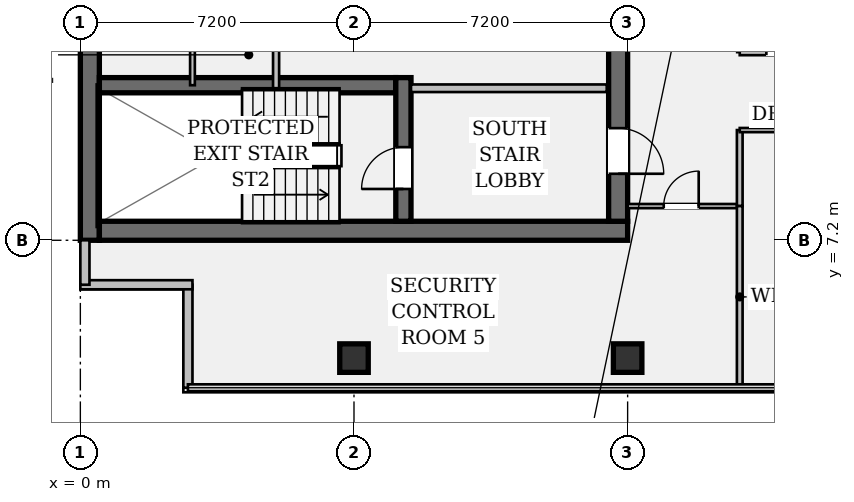
"""IFC4 building model, lengths in metres.
Left out: names, types, materials, properties, quantities, classifications, styles, units other than length and angle.
Written with IfcOpenShell. Run it as: python <this file> out.ifc"""

import sys

from ifc_helpers import new_model, si_unit, direction, frame, frame_2d, origin, origin_2d, place, context, subcontext, project, spatial, rectangle, hollow_rectangle, extrude, element, fill, save


model = new_model("IFC4")
c1 = context("Model", 3, precision=1e-05, world=origin(), true_north=direction((0.0, 1.0)))
c2 = subcontext(c1, "Body", "Model", "MODEL_VIEW")
j1 = project(units=[si_unit("LENGTHUNIT", "METRE"), si_unit("PLANEANGLEUNIT", "RADIAN")], contexts=[c1])
p1 = place(None, origin())
s1 = spatial("IfcSite", under=j1, at=p1, CompositionType="ELEMENT")
p2 = place(p1, origin())
s2 = spatial("IfcBuilding", under=s1, at=p2, CompositionType="ELEMENT")
p3 = place(p2, frame((0.0, 0.0, 229.25)))
s3 = spatial("IfcBuildingStorey", under=s2, at=p3, CompositionType="ELEMENT", Elevation=229.25)
p4 = place(p3, frame((0.25, 7.2, 0.0), z_axis=(0.0, 0.0, 1.0), x_axis=(0.0, 1.0, 0.0)))
e1 = element("IfcWall", 1, at=p4, inside=s3, PredefinedType="SHEAR", context=c2, shape_type="SweptSolid", body=[
    extrude(rectangle(XDim=28.8, YDim=0.5, at=frame_2d((14.4, 0.0))), origin(), (0.0, 0.0, 1.0), 3.24),
])
p5 = place(p3, frame((0.5, 7.45, 0.0), z_axis=(0.0, 0.0, 1.0), x_axis=(1.0, 0.0, 0.0)))
e2 = element("IfcWall", 2, at=p5, inside=s3, PredefinedType="SHEAR", context=c2, shape_type="SweptSolid", body=[
    extrude(rectangle(XDim=13.9, YDim=0.5, at=frame_2d((6.95, 0.0))), origin(), (0.0, 0.0, 1.0), 3.24),
])
p6 = place(p3, frame((14.15, 35.5, 0.0), z_axis=(0.0, 0.0, 1.0), x_axis=(0.0, -1.0, 0.0)))
e3 = element("IfcWall", 3, at=p6, inside=s3, PredefinedType="SHEAR", context=c2, shape_type="SweptSolid", body=[
    extrude(rectangle(XDim=27.8, YDim=0.5, at=frame_2d((13.9, 0.0))), origin(), (0.0, 0.0, 1.0), 3.24),
])
p7 = place(p6, frame((1.4, 0.0, 0.0)))
e4 = element("IfcOpeningElement", 4, at=p7, cuts=e3, PredefinedType="OPENING", context=c2, shape_type="SweptSolid", body=[
    extrude(rectangle(XDim=1.2, YDim=2.15, at=frame_2d((0.6, 1.075))), frame((0.0, 0.262, 0.0), z_axis=(0.0, -1.0, 0.0), x_axis=(1.0, 0.0, 0.0)), (0.0, 0.0, 1.0), 0.524),
])
p8 = place(p6, frame((25.35, 0.0, 0.0)))
e5 = element("IfcOpeningElement", 5, at=p8, cuts=e3, PredefinedType="OPENING", context=c2, shape_type="SweptSolid", body=[
    extrude(rectangle(XDim=1.2, YDim=2.15, at=frame_2d((0.6, 1.075))), frame((0.0, 0.262, 0.0), z_axis=(0.0, -1.0, 0.0), x_axis=(1.0, 0.0, 0.0)), (0.0, 0.0, 1.0), 0.524),
])
p9 = place(p6, frame((14.7, 0.0, 0.0)))
e6 = element("IfcOpeningElement", 6, at=p9, cuts=e3, PredefinedType="OPENING", context=c2, shape_type="SweptSolid", body=[
    extrude(rectangle(XDim=1.6, YDim=2.2, at=frame_2d((0.8, 1.1))), frame((0.0, 0.262, 0.0), z_axis=(0.0, -1.0, 0.0), x_axis=(1.0, 0.0, 0.0)), (0.0, 0.0, 1.0), 0.524),
])
p10 = place(p3, frame((0.5, 11.28, 0.0), z_axis=(0.0, 0.0, 1.0), x_axis=(1.0, 0.0, 0.0)))
e7 = element("IfcWall", 7, at=p10, inside=s3, PredefinedType="SHEAR", context=c2, shape_type="SweptSolid", body=[
    extrude(rectangle(XDim=7.8, YDim=0.4, at=frame_2d((3.9, 0.0))), origin(), (0.0, 0.0, 1.0), 3.24),
])
p11 = place(p3, frame((8.5, 7.7, 0.0), z_axis=(0.0, 0.0, 1.0), x_axis=(0.0, 1.0, 0.0)))
e8 = element("IfcWall", 8, at=p11, inside=s3, PredefinedType="SHEAR", context=c2, shape_type="SweptSolid", body=[
    extrude(rectangle(XDim=3.78, YDim=0.4, at=frame_2d((1.89, 0.0))), origin(), (0.0, 0.0, 1.0), 3.24),
])
p12 = place(p11, frame((0.85, 0.0, 0.0)))
e9 = element("IfcOpeningElement", 9, at=p12, cuts=e8, PredefinedType="OPENING", context=c2, shape_type="SweptSolid", body=[
    extrude(rectangle(XDim=1.1, YDim=2.15, at=frame_2d((0.55, 1.075))), frame((0.0, 0.212, 0.0), z_axis=(0.0, -1.0, 0.0), x_axis=(1.0, 0.0, 0.0)), (0.0, 0.0, 1.0), 0.424),
])
for number, where, z_axis, x_axis in (
    (10, (7.2, 4.1, 0.0), (0.0, 0.0, 1.0), (1.0, 0.0, 0.0)),
    (11, (14.4, 4.1, 0.0), (0.0, 0.0, 1.0), (1.0, 0.0, 0.0)),
):
    element("IfcColumn", number, at=place(p3, frame(where, z_axis=z_axis, x_axis=x_axis)), inside=s3, PredefinedType="COLUMN", context=c2, shape_type="SweptSolid", body=[
        extrude(hollow_rectangle(XDim=0.75, YDim=0.75, WallThickness=0.045, at=origin_2d()), origin(), (0.0, 0.0, 1.0), 3.24),
    ])
p13 = place(p3, frame((2.83, 3.32, 0.0), z_axis=(0.0, 0.0, 1.0), x_axis=(0.0, 1.0, 0.0)))
e12 = element("IfcWall", 12, at=p13, inside=s3, PredefinedType="STANDARD", context=c2, shape_type="SweptSolid", body=[
    extrude(rectangle(XDim=2.71, YDim=0.24, at=frame_2d((1.355, 0.0))), origin(), (0.0, 0.0, 1.0), 3.24),
])
p14 = place(p3, frame((2.95, 6.03, 0.0), z_axis=(0.0, 0.0, 1.0), x_axis=(-1.0, 0.0, 0.0)))
e13 = element("IfcWall", 13, at=p14, inside=s3, PredefinedType="STANDARD", context=c2, shape_type="SweptSolid", body=[
    extrude(rectangle(XDim=2.95, YDim=0.24, at=frame_2d((1.475, 0.0))), origin(), (0.0, 0.0, 1.0), 3.24),
])
p15 = place(p3, frame((0.12, 6.03, 0.0), z_axis=(0.0, 0.0, 1.0), x_axis=(0.0, 1.0, 0.0)))
e14 = element("IfcWall", 14, at=p15, inside=s3, PredefinedType="STANDARD", context=c2, shape_type="SweptSolid", body=[
    extrude(rectangle(XDim=1.17, YDim=0.24, at=frame_2d((0.585, 0.0))), origin(), (0.0, 0.0, 1.0), 3.24),
])
p16 = place(p3, frame((8.7, 11.2, 0.0), z_axis=(0.0, 0.0, 1.0), x_axis=(1.0, 0.0, 0.0)))
e15 = element("IfcWall", 15, at=p16, inside=s3, PredefinedType="PARTITIONING", context=c2, shape_type="SweptSolid", body=[
    extrude(rectangle(XDim=5.15, YDim=0.2, at=frame_2d((2.575, 0.0))), origin(), (0.0, 0.0, 1.0), 3.24),
])
p17 = place(p3, frame((5.15, 11.2, 0.0), z_axis=(0.0, 0.0, 1.0), x_axis=(0.0, 1.0, 0.0)))
e16 = element("IfcWall", 16, at=p17, inside=s3, PredefinedType="PARTITIONING", context=c2, shape_type="SweptSolid", body=[
    extrude(rectangle(XDim=6.6, YDim=0.16, at=frame_2d((3.3, 0.0))), origin(), (0.0, 0.0, 1.0), 3.24),
])
p18 = place(p3, frame((2.95, 11.28, 0.0), z_axis=(0.0, 0.0, 1.0), x_axis=(0.0, 1.0, 0.0)))
e17 = element("IfcWall", 17, at=p18, inside=s3, PredefinedType="PARTITIONING", context=c2, shape_type="SweptSolid", body=[
    extrude(rectangle(XDim=4.42, YDim=0.125, at=frame_2d((2.21, 0.0))), origin(), (0.0, 0.0, 1.0), 3.24),
])
p19 = place(p18, frame((1.6, 0.0, 0.0)))
e18 = element("IfcOpeningElement", 18, at=p19, cuts=e17, PredefinedType="OPENING", context=c2, shape_type="SweptSolid", body=[
    extrude(rectangle(XDim=0.85, YDim=2.15, at=frame_2d((0.425, 1.075))), frame((0.0, 0.074, 0.0), z_axis=(0.0, -1.0, 0.0), x_axis=(1.0, 0.0, 0.0)), (0.0, 0.0, 1.0), 0.149),
])
p20 = place(p3, frame((14.4, 8.1, 0.0), z_axis=(0.0, 0.0, 1.0), x_axis=(1.0, 0.0, 0.0)))
e19 = element("IfcWall", 19, at=p20, inside=s3, PredefinedType="PARTITIONING", context=c2, shape_type="SweptSolid", body=[
    extrude(rectangle(XDim=2.95, YDim=0.11, at=frame_2d((1.475, 0.0))), origin(), (0.0, 0.0, 1.0), 2.808),
])
p21 = place(p20, frame((0.95, 0.0, 0.0)))
e20 = element("IfcOpeningElement", 20, at=p21, cuts=e19, PredefinedType="OPENING", context=c2, shape_type="SweptSolid", body=[
    extrude(rectangle(XDim=0.92, YDim=2.15, at=frame_2d((0.46, 1.075))), frame((0.0, 0.067, 0.0), z_axis=(0.0, -1.0, 0.0), x_axis=(1.0, 0.0, 0.0)), (0.0, 0.0, 1.0), 0.134),
])
p22 = place(p3, frame((17.35, 8.1, 0.0), z_axis=(0.0, 0.0, 1.0), x_axis=(0.0, 1.0, 0.0)))
e21 = element("IfcWall", 21, at=p22, inside=s3, PredefinedType="PARTITIONING", context=c2, shape_type="SweptSolid", body=[
    extrude(rectangle(XDim=2.0, YDim=0.15, at=frame_2d((1.0, 0.0))), origin(), (0.0, 0.0, 1.0), 3.24),
])
p23 = place(p3, frame((17.35, 12.15, 0.0), z_axis=(0.0, 0.0, 1.0), x_axis=(0.0, 1.0, 0.0)))
e22 = element("IfcWall", 22, at=p23, inside=s3, PredefinedType="PARTITIONING", context=c2, shape_type="SweptSolid", body=[
    extrude(rectangle(XDim=23.05, YDim=0.135, at=frame_2d((11.525, 0.0))), origin(), (0.0, 0.0, 1.0), 2.325),
])
p24 = place(p23, frame((4.3, 0.0, 0.0)))
e23 = element("IfcOpeningElement", 23, at=p24, cuts=e22, PredefinedType="OPENING", context=c2, shape_type="SweptSolid", body=[
    extrude(rectangle(XDim=0.92, YDim=2.15, at=frame_2d((0.46, 1.075))), frame((0.0, 0.08, 0.0), z_axis=(0.0, -1.0, 0.0), x_axis=(1.0, 0.0, 0.0)), (0.0, 0.0, 1.0), 0.159),
])
p25 = place(p23, frame((8.0, 0.0, 0.0)))
e24 = element("IfcOpeningElement", 24, at=p25, cuts=e22, PredefinedType="OPENING", context=c2, shape_type="SweptSolid", body=[
    extrude(rectangle(XDim=0.92, YDim=2.15, at=frame_2d((0.46, 1.075))), frame((0.0, 0.08, 0.0), z_axis=(0.0, -1.0, 0.0), x_axis=(1.0, 0.0, 0.0)), (0.0, 0.0, 1.0), 0.159),
])
p26 = place(p23, frame((16.32, 0.0, 0.0)))
e25 = element("IfcOpeningElement", 25, at=p26, cuts=e22, PredefinedType="OPENING", context=c2, shape_type="SweptSolid", body=[
    extrude(rectangle(XDim=0.92, YDim=2.15, at=frame_2d((0.46, 1.075))), frame((0.0, 0.08, 0.0), z_axis=(0.0, -1.0, 0.0), x_axis=(1.0, 0.0, 0.0)), (0.0, 0.0, 1.0), 0.159),
])
p27 = place(p3, frame((17.35, 10.1, 0.0), z_axis=(0.0, 0.0, 1.0), x_axis=(1.0, 0.0, 0.0)))
e26 = element("IfcWall", 26, at=p27, inside=s3, PredefinedType="PARTITIONING", context=c2, shape_type="SweptSolid", body=[
    extrude(rectangle(XDim=17.4, YDim=0.11, at=frame_2d((8.7, 0.0))), origin(), (0.0, 0.0, 1.0), 2.325),
])
p28 = place(p27, frame((4.02, 0.0, 0.0)))
e27 = element("IfcOpeningElement", 27, at=p28, cuts=e26, PredefinedType="OPENING", context=c2, shape_type="SweptSolid", body=[
    extrude(rectangle(XDim=0.92, YDim=2.15, at=frame_2d((0.46, 1.075))), frame((0.0, 0.067, 0.0), z_axis=(0.0, -1.0, 0.0), x_axis=(1.0, 0.0, 0.0)), (0.0, 0.0, 1.0), 0.134),
])
p29 = place(p27, frame((12.72, 0.0, 0.0)))
e28 = element("IfcOpeningElement", 28, at=p29, cuts=e26, PredefinedType="OPENING", context=c2, shape_type="SweptSolid", body=[
    extrude(rectangle(XDim=0.92, YDim=2.15, at=frame_2d((0.46, 1.075))), frame((0.0, 0.067, 0.0), z_axis=(0.0, -1.0, 0.0), x_axis=(1.0, 0.0, 0.0)), (0.0, 0.0, 1.0), 0.134),
])
p30 = place(p3, frame((17.35, 12.15, 0.0), z_axis=(0.0, 0.0, 1.0), x_axis=(1.0, 0.0, 0.0)))
e29 = element("IfcWall", 29, at=p30, inside=s3, PredefinedType="PARTITIONING", context=c2, shape_type="SweptSolid", body=[
    extrude(rectangle(XDim=17.4, YDim=0.16, at=frame_2d((8.7, 0.0))), origin(), (0.0, 0.0, 1.0), 2.325),
])
p31 = place(p30, frame((0.7, 0.0, 0.0)))
e30 = element("IfcOpeningElement", 30, at=p31, cuts=e29, PredefinedType="OPENING", context=c2, shape_type="SweptSolid", body=[
    extrude(rectangle(XDim=0.85, YDim=2.15, at=frame_2d((0.425, 1.075))), frame((0.0, 0.092, 0.0), z_axis=(0.0, -1.0, 0.0), x_axis=(1.0, 0.0, 0.0)), (0.0, 0.0, 1.0), 0.184),
])
p32 = place(p30, frame((3.95, 0.0, 0.0)))
e31 = element("IfcOpeningElement", 31, at=p32, cuts=e29, PredefinedType="OPENING", context=c2, shape_type="SweptSolid", body=[
    extrude(rectangle(XDim=0.85, YDim=2.15, at=frame_2d((0.425, 1.075))), frame((0.0, 0.092, 0.0), z_axis=(0.0, -1.0, 0.0), x_axis=(1.0, 0.0, 0.0)), (0.0, 0.0, 1.0), 0.184),
])
p33 = place(p30, frame((6.46, 0.0, 0.0)))
e32 = element("IfcOpeningElement", 32, at=p33, cuts=e29, PredefinedType="OPENING", context=c2, shape_type="SweptSolid", body=[
    extrude(rectangle(XDim=0.85, YDim=2.15, at=frame_2d((0.425, 1.075))), frame((0.0, 0.092, 0.0), z_axis=(0.0, -1.0, 0.0), x_axis=(1.0, 0.0, 0.0)), (0.0, 0.0, 1.0), 0.184),
])
p34 = place(p30, frame((9.5, 0.0, 0.0)))
e33 = element("IfcOpeningElement", 33, at=p34, cuts=e29, PredefinedType="OPENING", context=c2, shape_type="SweptSolid", body=[
    extrude(rectangle(XDim=0.92, YDim=2.15, at=frame_2d((0.46, 1.075))), frame((0.0, 0.092, 0.0), z_axis=(0.0, -1.0, 0.0), x_axis=(1.0, 0.0, 0.0)), (0.0, 0.0, 1.0), 0.184),
])
p35 = place(p3, frame((17.35, 3.32, 0.0), z_axis=(0.0, 0.0, 1.0), x_axis=(0.0, 1.0, 0.0)))
e34 = element("IfcWall", 34, at=p35, inside=s3, PredefinedType="PARTITIONING", context=c2, shape_type="SweptSolid", body=[
    extrude(rectangle(XDim=4.78, YDim=0.15, at=frame_2d((2.39, 0.0))), origin(), (0.0, 0.0, 1.0), 2.808),
])
p36 = place(p12, origin())
e35 = element("IfcDoor", 35, at=p36, inside=s3, OperationType="SINGLE_SWING_LEFT", PredefinedType="DOOR", context=c2, shape_type="SweptSolid", body=[
    extrude(rectangle(XDim=1.1, YDim=2.15, at=frame_2d((0.55, 1.075))), frame((0.0, 0.025, 0.0), z_axis=(0.0, -1.0, 0.0), x_axis=(1.0, 0.0, 0.0)), (0.0, 0.0, 1.0), 0.05),
])
fill(e9, e35)
p37 = place(p8, origin())
e36 = element("IfcDoor", 36, at=p37, inside=s3, OperationType="SINGLE_SWING_RIGHT", PredefinedType="DOOR", context=c2, shape_type="SweptSolid", body=[
    extrude(rectangle(XDim=1.2, YDim=2.15, at=frame_2d((0.6, 1.075))), frame((0.0, 0.025, 0.0), z_axis=(0.0, -1.0, 0.0), x_axis=(1.0, 0.0, 0.0)), (0.0, 0.0, 1.0), 0.05),
])
fill(e5, e36)
p38 = place(p31, origin())
e37 = element("IfcDoor", 37, at=p38, inside=s3, OperationType="SINGLE_SWING_LEFT", PredefinedType="DOOR", context=c2, shape_type="SweptSolid", body=[
    extrude(rectangle(XDim=0.85, YDim=2.15, at=frame_2d((0.425, 1.075))), frame((0.0, 0.025, 0.0), z_axis=(0.0, -1.0, 0.0), x_axis=(1.0, 0.0, 0.0)), (0.0, 0.0, 1.0), 0.05),
])
fill(e30, e37)
p39 = place(p21, origin())
e38 = element("IfcDoor", 38, at=p39, inside=s3, OperationType="SINGLE_SWING_RIGHT", PredefinedType="DOOR", context=c2, shape_type="SweptSolid", body=[
    extrude(rectangle(XDim=0.92, YDim=2.15, at=frame_2d((0.46, 1.075))), frame((0.0, 0.025, 0.0), z_axis=(0.0, -1.0, 0.0), x_axis=(1.0, 0.0, 0.0)), (0.0, 0.0, 1.0), 0.05),
])
fill(e20, e38)
save(model, sys.argv[1])
